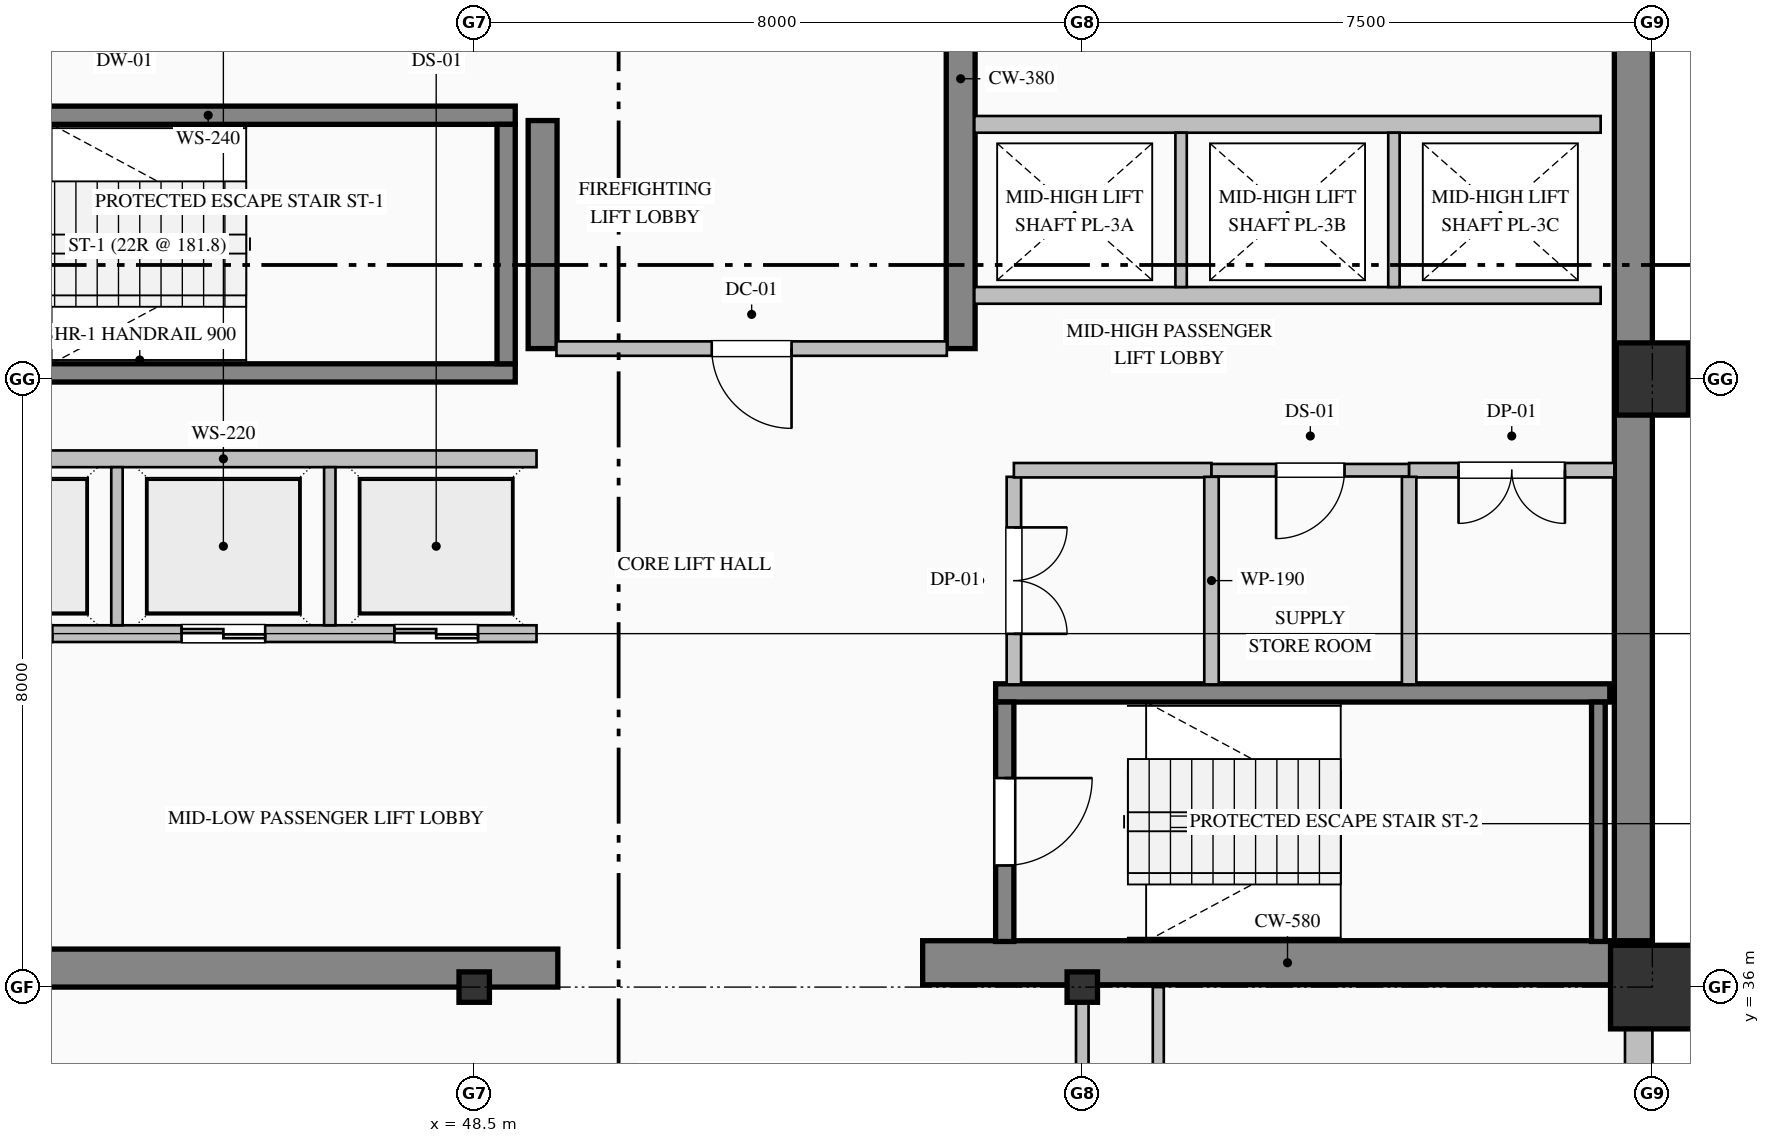
"""IFC4 building model, lengths in metres.
Left out: names, types, materials, properties, quantities, classifications, styles, units other than length and angle.
Written with IfcOpenShell. Run it as: python <this file> out.ifc"""

import sys

from ifc_helpers import new_model, si_unit, direction, frame, frame_2d, origin, origin_2d, place, context, subcontext, project, spatial, rectangle, hollow_rectangle, i_section, extrude, element, fill, save


model = new_model("IFC4")
c1 = context("Model", 3, precision=1e-05, world=origin(), true_north=direction((0.0, 1.0)))
c2 = subcontext(c1, "Body", "Model", "MODEL_VIEW")
j1 = project(units=[si_unit("LENGTHUNIT", "METRE"), si_unit("PLANEANGLEUNIT", "RADIAN")], contexts=[c1])
p1 = place(None, origin())
s1 = spatial("IfcSite", under=j1, at=p1, CompositionType="ELEMENT")
p2 = place(p1, origin())
s2 = spatial("IfcBuilding", under=s1, at=p2, CompositionType="ELEMENT")
p3 = place(p2, frame((0.0, 0.0, 159.0)))
s3 = spatial("IfcBuildingStorey", under=s2, at=p3, CompositionType="ELEMENT", Elevation=159.0)
p4 = place(p3, frame((63.75, 36.32, 0.0), z_axis=(0.0, 0.0, 1.0), x_axis=(0.0, 1.0, 0.0)))
e1 = element("IfcWall", 1, at=p4, inside=s3, PredefinedType="SHEAR", context=c2, shape_type="SweptSolid", body=[
    extrude(rectangle(XDim=15.18, YDim=0.5, at=frame_2d((7.59, 0.0))), origin(), (0.0, 0.0, 1.0), 3.765),
])
p5 = place(p3, frame((40.5, 36.25, 0.0), z_axis=(0.0, 0.0, 1.0), x_axis=(1.0, 0.0, 0.0)))
e2 = element("IfcWall", 2, at=p5, inside=s3, PredefinedType="SHEAR", context=c2, shape_type="SweptSolid", body=[
    extrude(rectangle(XDim=9.1, YDim=0.5, at=frame_2d((4.55, 0.0))), origin(), (0.0, 0.0, 1.0), 3.765),
])
p6 = place(p3, frame((54.4, 36.32, 0.0), z_axis=(0.0, 0.0, 1.0), x_axis=(1.0, 0.0, 0.0)))
e3 = element("IfcWall", 3, at=p6, inside=s3, PredefinedType="SHEAR", context=c2, shape_type="SweptSolid", body=[
    extrude(rectangle(XDim=9.6, YDim=0.58, at=frame_2d((4.8, 0.0))), origin(), (0.0, 0.0, 1.0), 4.0),
])
p7 = place(p3, frame((49.4, 44.4, 0.0), z_axis=(0.0, 0.0, 1.0), x_axis=(0.0, 1.0, 0.0)))
e4 = element("IfcWall", 4, at=p7, inside=s3, PredefinedType="SHEAR", context=c2, shape_type="SweptSolid", body=[
    extrude(rectangle(XDim=3.0, YDim=0.38, at=frame_2d((1.5, 0.0))), origin(), (0.0, 0.0, 1.0), 3.765),
])
p8 = place(p3, frame((54.9, 44.4, 0.0), z_axis=(0.0, 0.0, 1.0), x_axis=(0.0, 1.0, 0.0)))
e5 = element("IfcWall", 5, at=p8, inside=s3, PredefinedType="SHEAR", context=c2, shape_type="SweptSolid", body=[
    extrude(rectangle(XDim=7.1, YDim=0.38, at=frame_2d((3.55, 0.0))), origin(), (0.0, 0.0, 1.0), 3.765),
])
for number, where, z_axis, x_axis in (
    (6, (48.5, 36.0, 0.0), (0.0, 0.0, 1.0), (1.0, 0.0, 0.0)),
    (7, (56.5, 36.0, 0.0), (0.0, 0.0, 1.0), (1.0, 0.0, 0.0)),
):
    element("IfcColumn", number, at=place(p3, frame(where, z_axis=z_axis, x_axis=x_axis)), inside=s3, PredefinedType="COLUMN", context=c2, shape_type="SweptSolid", body=[
        extrude(i_section(OverallWidth=0.4, OverallDepth=0.4, WebThickness=0.013, FlangeThickness=0.021, FilletRadius=0.022, at=origin_2d()), origin(), (0.0, 0.0, 1.0), 4.0),
    ])
p9 = place(p3, frame((64.0, 36.0, 0.0), z_axis=(0.0, 0.0, 1.0), x_axis=(1.0, 0.0, 0.0)))
e8 = element("IfcColumn", 8, at=p9, inside=s3, PredefinedType="COLUMN", context=c2, shape_type="SweptSolid", body=[
    extrude(hollow_rectangle(XDim=1.1, YDim=1.1, WallThickness=0.04, at=origin_2d()), origin(), (0.0, 0.0, 1.0), 4.0),
])
p10 = place(p3, frame((64.0, 44.0, 0.0), z_axis=(0.0, 0.0, 1.0), x_axis=(1.0, 0.0, 0.0)))
e9 = element("IfcColumn", 9, at=p10, inside=s3, PredefinedType="COLUMN", context=c2, shape_type="SweptSolid", body=[
    extrude(hollow_rectangle(XDim=0.95, YDim=0.95, WallThickness=0.036, at=origin_2d()), origin(), (0.0, 0.0, 1.0), 4.0),
])
p11 = place(p3, frame((63.82, 36.05, 0.0), z_axis=(0.0, 0.0, 1.0), x_axis=(0.0, -1.0, 0.0)))
e10 = element("IfcWall", 10, at=p11, inside=s3, PredefinedType="SOLIDWALL", context=c2, shape_type="SweptSolid", body=[
    extrude(rectangle(XDim=28.05, YDim=0.36, at=frame_2d((14.025, 0.0))), origin(), (0.0, 0.0, 1.0), 3.265),
])
p12 = place(p11, frame((3.0, 0.0, 0.7)))
e11 = element("IfcOpeningElement", 11, at=p12, cuts=e10, PredefinedType="OPENING", context=c2, shape_type="SweptSolid", body=[
    extrude(rectangle(XDim=1.2, YDim=1.85, at=frame_2d((0.6, 0.925))), frame((0.0, 0.19, 0.0), z_axis=(0.0, -1.0, 0.0), x_axis=(1.0, 0.0, 0.0)), (0.0, 0.0, 1.0), 0.38),
])
p13 = place(p11, frame((9.975, 0.0, 0.85)))
e12 = element("IfcOpeningElement", 12, at=p13, cuts=e10, PredefinedType="OPENING", context=c2, shape_type="SweptSolid", body=[
    extrude(rectangle(XDim=1.65, YDim=1.95, at=frame_2d((0.825, 0.975))), frame((0.0, 0.19, 0.0), z_axis=(0.0, -1.0, 0.0), x_axis=(1.0, 0.0, 0.0)), (0.0, 0.0, 1.0), 0.38),
])
p14 = place(p11, frame((13.8, 0.0, 0.7)))
e13 = element("IfcOpeningElement", 13, at=p14, cuts=e10, PredefinedType="OPENING", context=c2, shape_type="SweptSolid", body=[
    extrude(rectangle(XDim=1.2, YDim=1.85, at=frame_2d((0.6, 0.925))), frame((0.0, 0.19, 0.0), z_axis=(0.0, -1.0, 0.0), x_axis=(1.0, 0.0, 0.0)), (0.0, 0.0, 1.0), 0.38),
])
p15 = place(p11, frame((24.6, 0.0, 0.7)))
e14 = element("IfcOpeningElement", 14, at=p15, cuts=e10, PredefinedType="OPENING", context=c2, shape_type="SweptSolid", body=[
    extrude(rectangle(XDim=1.2, YDim=1.85, at=frame_2d((0.6, 0.925))), frame((0.0, 0.19, 0.0), z_axis=(0.0, -1.0, 0.0), x_axis=(1.0, 0.0, 0.0)), (0.0, 0.0, 1.0), 0.38),
])
for number, where, z_axis, x_axis in (
    (15, (40.96, 47.47, 0.0), (0.0, 0.0, 1.0), (1.0, 0.0, 0.0)),
    (16, (49.04, 44.08, 0.0), (0.0, 0.0, 1.0), (-1.0, 0.0, 0.0)),
):
    element("IfcWall", number, at=place(p3, frame(where, z_axis=z_axis, x_axis=x_axis)), inside=s3, PredefinedType="SOLIDWALL", context=c2, shape_type="SweptSolid", body=[
        extrude(rectangle(XDim=8.08, YDim=0.24, at=frame_2d((4.04, 0.0))), origin(), (0.0, 0.0, 1.0), 4.0),
    ])
p16 = place(p3, frame((48.92, 44.2, 0.0), z_axis=(0.0, 0.0, 1.0), x_axis=(0.0, 1.0, 0.0)))
e17 = element("IfcWall", 17, at=p16, inside=s3, PredefinedType="SOLIDWALL", context=c2, shape_type="SweptSolid", body=[
    extrude(rectangle(XDim=3.15, YDim=0.24, at=frame_2d((1.575, 0.0))), origin(), (0.0, 0.0, 1.0), 4.0),
])
p17 = place(p3, frame((55.36, 39.87, 0.0), z_axis=(0.0, 0.0, 1.0), x_axis=(1.0, 0.0, 0.0)))
e18 = element("IfcWall", 18, at=p17, inside=s3, PredefinedType="SOLIDWALL", context=c2, shape_type="SweptSolid", body=[
    extrude(rectangle(XDim=8.08, YDim=0.24, at=frame_2d((4.04, 0.0))), origin(), (0.0, 0.0, 1.0), 4.0),
])
p18 = place(p3, frame((55.48, 39.75, 0.0), z_axis=(0.0, 0.0, 1.0), x_axis=(0.0, -1.0, 0.0)))
e19 = element("IfcWall", 19, at=p18, inside=s3, PredefinedType="SOLIDWALL", context=c2, shape_type="SweptSolid", body=[
    extrude(rectangle(XDim=3.15, YDim=0.24, at=frame_2d((1.575, 0.0))), origin(), (0.0, 0.0, 1.0), 4.0),
])
p19 = place(p18, frame((1.0, 0.0, 0.0)))
e20 = element("IfcOpeningElement", 20, at=p19, cuts=e19, PredefinedType="OPENING", context=c2, shape_type="SweptSolid", body=[
    extrude(rectangle(XDim=1.15, YDim=2.2, at=frame_2d((0.575, 1.1))), frame((0.0, 0.13, 0.0), z_axis=(0.0, -1.0, 0.0), x_axis=(1.0, 0.0, 0.0)), (0.0, 0.0, 1.0), 0.26),
])
p20 = place(p3, frame((63.29, 36.6, 0.0), z_axis=(0.0, 0.0, 1.0), x_axis=(0.0, 1.0, 0.0)))
e21 = element("IfcWall", 21, at=p20, inside=s3, PredefinedType="SOLIDWALL", context=c2, shape_type="SweptSolid", body=[
    extrude(rectangle(XDim=3.15, YDim=0.18, at=frame_2d((1.575, 0.0))), origin(), (0.0, 0.0, 1.0), 4.0),
])
p21 = place(p3, frame((49.32, 40.65, 0.0), z_axis=(0.0, 0.0, 1.0), x_axis=(-1.0, 0.0, 0.0)))
e22 = element("IfcWall", 22, at=p21, inside=s3, PredefinedType="PARTITIONING", context=c2, shape_type="SweptSolid", body=[
    extrude(rectangle(XDim=8.24, YDim=0.22, at=frame_2d((4.12, 0.0))), origin(), (0.0, 0.0, 1.0), 3.765),
])
p22 = place(p21, frame((6.37, 0.0, 0.0)))
e23 = element("IfcOpeningElement", 23, at=p22, cuts=e22, PredefinedType="OPENING", context=c2, shape_type="SweptSolid", body=[
    extrude(rectangle(XDim=1.1, YDim=2.2, at=frame_2d((0.55, 1.1))), frame((0.0, 0.12, 0.0), z_axis=(0.0, -1.0, 0.0), x_axis=(1.0, 0.0, 0.0)), (0.0, 0.0, 1.0), 0.24),
])
p23 = place(p21, frame((3.57, 0.0, 0.0)))
e24 = element("IfcOpeningElement", 24, at=p23, cuts=e22, PredefinedType="OPENING", context=c2, shape_type="SweptSolid", body=[
    extrude(rectangle(XDim=1.1, YDim=2.2, at=frame_2d((0.55, 1.1))), frame((0.0, 0.12, 0.0), z_axis=(0.0, -1.0, 0.0), x_axis=(1.0, 0.0, 0.0)), (0.0, 0.0, 1.0), 0.24),
])
p24 = place(p21, frame((0.77, 0.0, 0.0)))
e25 = element("IfcOpeningElement", 25, at=p24, cuts=e22, PredefinedType="OPENING", context=c2, shape_type="SweptSolid", body=[
    extrude(rectangle(XDim=1.1, YDim=2.2, at=frame_2d((0.55, 1.1))), frame((0.0, 0.12, 0.0), z_axis=(0.0, -1.0, 0.0), x_axis=(1.0, 0.0, 0.0)), (0.0, 0.0, 1.0), 0.24),
])
p25 = place(p3, frame((41.08, 42.95, 0.0), z_axis=(0.0, 0.0, 1.0), x_axis=(1.0, 0.0, 0.0)))
e26 = element("IfcWall", 26, at=p25, inside=s3, PredefinedType="PARTITIONING", context=c2, shape_type="SweptSolid", body=[
    extrude(rectangle(XDim=8.24, YDim=0.22, at=frame_2d((4.12, 0.0))), origin(), (0.0, 0.0, 1.0), 3.765),
])
for number, where, z_axis, x_axis in (
    (27, (43.8, 40.76, 0.0), (0.0, 0.0, 1.0), (0.0, 1.0, 0.0)),
    (28, (46.6, 40.76, 0.0), (0.0, 0.0, 1.0), (0.0, 1.0, 0.0)),
):
    element("IfcWall", number, at=place(p3, frame(where, z_axis=z_axis, x_axis=x_axis)), inside=s3, PredefinedType="PARTITIONING", context=c2, shape_type="SweptSolid", body=[
        extrude(rectangle(XDim=2.08, YDim=0.15, at=frame_2d((1.04, 0.0))), origin(), (0.0, 0.0, 1.0), 3.765),
    ])
for number, where, z_axis, x_axis in (
    (29, (63.32, 45.1, 0.0), (0.0, 0.0, 1.0), (-1.0, 0.0, 0.0)),
    (30, (55.08, 47.35, 0.0), (0.0, 0.0, 1.0), (1.0, 0.0, 0.0)),
):
    element("IfcWall", number, at=place(p3, frame(where, z_axis=z_axis, x_axis=x_axis)), inside=s3, PredefinedType="PARTITIONING", context=c2, shape_type="SweptSolid", body=[
        extrude(rectangle(XDim=8.24, YDim=0.22, at=frame_2d((4.12, 0.0))), origin(), (0.0, 0.0, 1.0), 3.765),
    ])
for number, where, z_axis, x_axis in (
    (31, (57.8, 45.21, 0.0), (0.0, 0.0, 1.0), (0.0, 1.0, 0.0)),
    (32, (60.6, 45.21, 0.0), (0.0, 0.0, 1.0), (0.0, 1.0, 0.0)),
):
    element("IfcWall", number, at=place(p3, frame(where, z_axis=z_axis, x_axis=x_axis)), inside=s3, PredefinedType="PARTITIONING", context=c2, shape_type="SweptSolid", body=[
        extrude(rectangle(XDim=2.03, YDim=0.15, at=frame_2d((1.015, 0.0))), origin(), (0.0, 0.0, 1.0), 3.765),
    ])
p26 = place(p3, frame((54.718, 44.4, 0.0), z_axis=(0.0, 0.0, 1.0), x_axis=(-1.0, 0.0, 0.0)))
e33 = element("IfcWall", 33, at=p26, inside=s3, PredefinedType="PARTITIONING", context=c2, shape_type="SweptSolid", body=[
    extrude(rectangle(XDim=5.136, YDim=0.19, at=frame_2d((2.568, 0.0))), origin(), (0.0, 0.0, 1.0), 3.765),
])
p27 = place(p26, frame((2.043, 0.0, 0.0)))
e34 = element("IfcOpeningElement", 34, at=p27, cuts=e33, PredefinedType="OPENING", context=c2, shape_type="SweptSolid", body=[
    extrude(rectangle(XDim=1.05, YDim=2.15, at=frame_2d((0.525, 1.075))), frame((0.0, 0.105, 0.0), z_axis=(0.0, -1.0, 0.0), x_axis=(1.0, 0.0, 0.0)), (0.0, 0.0, 1.0), 0.21),
])
p28 = place(p3, frame((55.6, 42.713, 0.0), z_axis=(0.0, 0.0, 1.0), x_axis=(0.0, -1.0, 0.0)))
e35 = element("IfcWall", 35, at=p28, inside=s3, PredefinedType="PARTITIONING", context=c2, shape_type="SweptSolid", body=[
    extrude(rectangle(XDim=2.731, YDim=0.19, at=frame_2d((1.365, 0.0))), origin(), (0.0, 0.0, 1.0), 3.765),
])
p29 = place(p28, frame((0.666, 0.0, 0.0)))
e36 = element("IfcOpeningElement", 36, at=p29, cuts=e35, PredefinedType="OPENING", context=c2, shape_type="SweptSolid", body=[
    extrude(rectangle(XDim=1.4, YDim=2.25, at=frame_2d((0.7, 1.125))), frame((0.0, 0.105, 0.0), z_axis=(0.0, -1.0, 0.0), x_axis=(1.0, 0.0, 0.0)), (0.0, 0.0, 1.0), 0.21),
])
p30 = place(p3, frame((58.2, 42.8, 0.0), z_axis=(0.0, 0.0, 1.0), x_axis=(-1.0, 0.0, 0.0)))
e37 = element("IfcWall", 37, at=p30, inside=s3, PredefinedType="PARTITIONING", context=c2, shape_type="SweptSolid", body=[
    extrude(rectangle(XDim=2.6, YDim=0.19, at=frame_2d((1.3, 0.0))), origin(), (0.0, 0.0, 1.0), 3.765),
])
p31 = place(p3, frame((60.8, 42.8, 0.0), z_axis=(0.0, 0.0, 1.0), x_axis=(-1.0, 0.0, 0.0)))
e38 = element("IfcWall", 38, at=p31, inside=s3, PredefinedType="PARTITIONING", context=c2, shape_type="SweptSolid", body=[
    extrude(rectangle(XDim=2.6, YDim=0.165, at=frame_2d((1.3, 0.0))), origin(), (0.0, 0.0, 1.0), 3.765),
])
p32 = place(p31, frame((0.85, 0.0, 0.0)))
e39 = element("IfcOpeningElement", 39, at=p32, cuts=e38, PredefinedType="OPENING", context=c2, shape_type="SweptSolid", body=[
    extrude(rectangle(XDim=0.9, YDim=2.15, at=frame_2d((0.45, 1.075))), frame((0.0, 0.093, 0.0), z_axis=(0.0, -1.0, 0.0), x_axis=(1.0, 0.0, 0.0)), (0.0, 0.0, 1.0), 0.185),
])
p33 = place(p3, frame((63.5, 42.8, 0.0), z_axis=(0.0, 0.0, 1.0), x_axis=(-1.0, 0.0, 0.0)))
e40 = element("IfcWall", 40, at=p33, inside=s3, PredefinedType="PARTITIONING", context=c2, shape_type="SweptSolid", body=[
    extrude(rectangle(XDim=2.7, YDim=0.19, at=frame_2d((1.35, 0.0))), origin(), (0.0, 0.0, 1.0), 3.765),
])
p34 = place(p33, frame((0.65, 0.0, 0.0)))
e41 = element("IfcOpeningElement", 41, at=p34, cuts=e40, PredefinedType="OPENING", context=c2, shape_type="SweptSolid", body=[
    extrude(rectangle(XDim=1.4, YDim=2.25, at=frame_2d((0.7, 1.125))), frame((0.0, 0.105, 0.0), z_axis=(0.0, -1.0, 0.0), x_axis=(1.0, 0.0, 0.0)), (0.0, 0.0, 1.0), 0.21),
])
for number, where, z_axis, x_axis in (
    (42, (58.2, 42.713, 0.0), (0.0, 0.0, 1.0), (0.0, -1.0, 0.0)),
    (43, (60.8, 42.713, 0.0), (0.0, 0.0, 1.0), (0.0, -1.0, 0.0)),
):
    element("IfcWall", number, at=place(p3, frame(where, z_axis=z_axis, x_axis=x_axis)), inside=s3, PredefinedType="PARTITIONING", context=c2, shape_type="SweptSolid", body=[
        extrude(rectangle(XDim=2.731, YDim=0.19, at=frame_2d((1.365, 0.0))), origin(), (0.0, 0.0, 1.0), 3.765),
    ])
p35 = place(p3, frame((56.5, 36.0, 0.0), z_axis=(0.0, 0.0, 1.0), x_axis=(0.0, -1.0, 0.0)))
e44 = element("IfcWall", 44, at=p35, inside=s3, PredefinedType="PARTITIONING", context=c2, shape_type="SweptSolid", body=[
    extrude(rectangle(XDim=2.325, YDim=0.165, at=frame_2d((1.163, 0.0))), origin(), (0.0, 0.0, 1.0), 3.157),
])
p36 = place(p3, frame((57.5, 36.0, 0.0), z_axis=(0.0, 0.0, 1.0), x_axis=(0.0, -1.0, 0.0)))
e45 = element("IfcWall", 45, at=p36, inside=s3, PredefinedType="PARTITIONING", context=c2, shape_type="SweptSolid", body=[
    extrude(rectangle(XDim=21.226, YDim=0.145, at=frame_2d((10.613, 0.0))), origin(), (0.0, 0.0, 1.0), 3.765),
])
p37 = place(p19, origin())
e46 = element("IfcDoor", 46, at=p37, inside=s3, OperationType="SINGLE_SWING_LEFT", PredefinedType="DOOR", context=c2, shape_type="SweptSolid", body=[
    extrude(rectangle(XDim=1.15, YDim=2.2, at=frame_2d((0.575, 1.1))), frame((0.0, 0.025, 0.0), z_axis=(0.0, -1.0, 0.0), x_axis=(1.0, 0.0, 0.0)), (0.0, 0.0, 1.0), 0.05),
])
fill(e20, e46)
p38 = place(p23, origin())
e47 = element("IfcDoor", 47, at=p38, inside=s3, OperationType="DOUBLE_DOOR_SLIDING", PredefinedType="DOOR", context=c2, shape_type="SweptSolid", body=[
    extrude(rectangle(XDim=1.1, YDim=2.2, at=frame_2d((0.55, 1.1))), frame((0.0, 0.025, 0.0), z_axis=(0.0, -1.0, 0.0), x_axis=(1.0, 0.0, 0.0)), (0.0, 0.0, 1.0), 0.05),
])
fill(e24, e47)
p39 = place(p24, origin())
e48 = element("IfcDoor", 48, at=p39, inside=s3, OperationType="DOUBLE_DOOR_SLIDING", PredefinedType="DOOR", context=c2, shape_type="SweptSolid", body=[
    extrude(rectangle(XDim=1.1, YDim=2.2, at=frame_2d((0.55, 1.1))), frame((0.0, 0.025, 0.0), z_axis=(0.0, -1.0, 0.0), x_axis=(1.0, 0.0, 0.0)), (0.0, 0.0, 1.0), 0.05),
])
fill(e25, e48)
p40 = place(p27, origin())
e49 = element("IfcDoor", 49, at=p40, inside=s3, OperationType="SINGLE_SWING_LEFT", PredefinedType="DOOR", context=c2, shape_type="SweptSolid", body=[
    extrude(rectangle(XDim=1.05, YDim=2.15, at=frame_2d((0.525, 1.075))), frame((0.0, 0.025, 0.0), z_axis=(0.0, -1.0, 0.0), x_axis=(1.0, 0.0, 0.0)), (0.0, 0.0, 1.0), 0.05),
])
fill(e34, e49)
p41 = place(p29, origin())
e50 = element("IfcDoor", 50, at=p41, inside=s3, OperationType="DOUBLE_DOOR_SINGLE_SWING", PredefinedType="DOOR", context=c2, shape_type="SweptSolid", body=[
    extrude(rectangle(XDim=1.4, YDim=2.25, at=frame_2d((0.7, 1.125))), frame((0.0, 0.025, 0.0), z_axis=(0.0, -1.0, 0.0), x_axis=(1.0, 0.0, 0.0)), (0.0, 0.0, 1.0), 0.05),
])
fill(e36, e50)
p42 = place(p32, origin())
e51 = element("IfcDoor", 51, at=p42, inside=s3, OperationType="SINGLE_SWING_RIGHT", PredefinedType="DOOR", context=c2, shape_type="SweptSolid", body=[
    extrude(rectangle(XDim=0.9, YDim=2.15, at=frame_2d((0.45, 1.075))), frame((0.0, 0.025, 0.0), z_axis=(0.0, -1.0, 0.0), x_axis=(1.0, 0.0, 0.0)), (0.0, 0.0, 1.0), 0.05),
])
fill(e39, e51)
p43 = place(p34, origin())
e52 = element("IfcDoor", 52, at=p43, inside=s3, OperationType="DOUBLE_DOOR_SINGLE_SWING", PredefinedType="DOOR", context=c2, shape_type="SweptSolid", body=[
    extrude(rectangle(XDim=1.4, YDim=2.25, at=frame_2d((0.7, 1.125))), frame((0.0, 0.025, 0.0), z_axis=(0.0, -1.0, 0.0), x_axis=(1.0, 0.0, 0.0)), (0.0, 0.0, 1.0), 0.05),
])
fill(e41, e52)
save(model, sys.argv[1])
